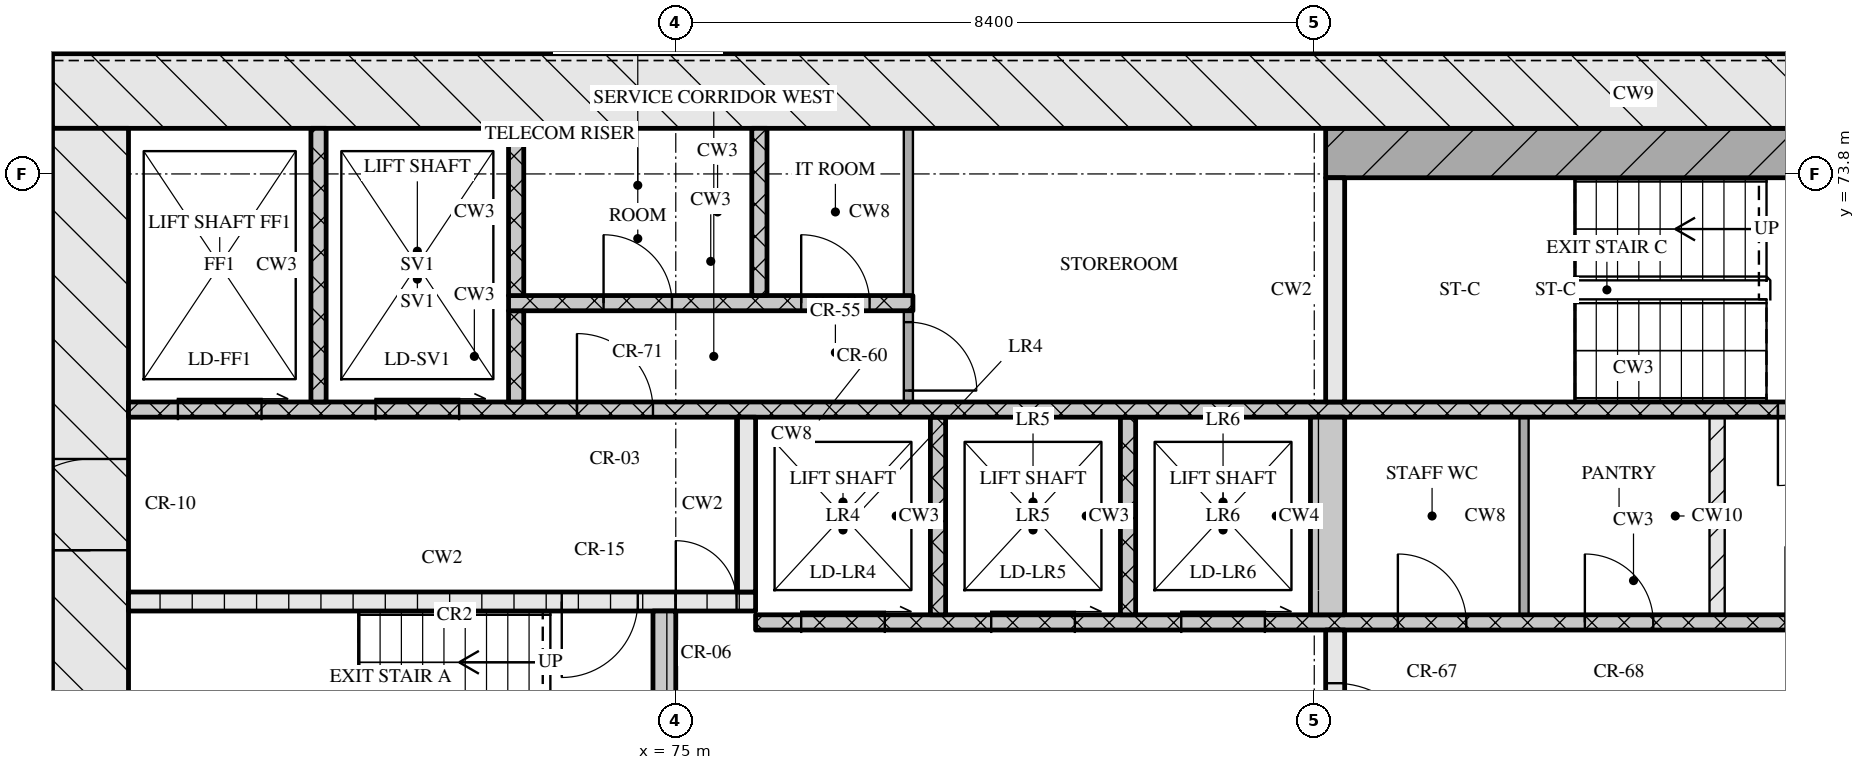
"""IFC4 building model, lengths in metres.
Left out: names, types, materials, properties, quantities, classifications, styles, units other than length and angle.
Written with IfcOpenShell. Run it as: python <this file> out.ifc"""

import sys

from ifc_helpers import new_model, si_unit, direction, frame, frame_2d, origin, place, context, subcontext, project, spatial, rectangle, extrude, element, fill, save


model = new_model("IFC4")
c1 = context("Model", 3, precision=1e-05, world=origin(), true_north=direction((0.0, 1.0)))
c2 = subcontext(c1, "Body", "Model", "MODEL_VIEW")
j1 = project(units=[si_unit("LENGTHUNIT", "METRE"), si_unit("PLANEANGLEUNIT", "RADIAN")], contexts=[c1])
p1 = place(None, origin())
s1 = spatial("IfcSite", under=j1, at=p1, CompositionType="ELEMENT")
p2 = place(p1, origin())
s2 = spatial("IfcBuilding", under=s1, at=p2, CompositionType="ELEMENT")
p3 = place(p2, frame((0.0, 0.0, 127.65)))
s3 = spatial("IfcBuildingStorey", under=s2, at=p3, CompositionType="ELEMENT", Elevation=127.65)
p4 = place(p3, frame((66.8, 74.9, 0.0), z_axis=(0.0, 0.0, 1.0), x_axis=(1.0, 0.0, 0.0)))
e1 = element("IfcWall", 1, at=p4, inside=s3, PredefinedType="SOLIDWALL", context=c2, shape_type="SweptSolid", body=[
    extrude(rectangle(XDim=41.6, YDim=1.0, at=frame_2d((20.8, 0.0))), origin(), (0.0, 0.0, 1.0), 3.32),
])
p5 = place(p3, frame((67.3, 62.4, 0.0), z_axis=(0.0, 0.0, 1.0), x_axis=(0.0, 1.0, 0.0)))
e2 = element("IfcWall", 2, at=p5, inside=s3, PredefinedType="SOLIDWALL", context=c2, shape_type="SweptSolid", body=[
    extrude(rectangle(XDim=12.0, YDim=1.0, at=frame_2d((6.0, 0.0))), origin(), (0.0, 0.0, 1.0), 3.32),
])
p6 = place(p5, frame((6.45, 0.0, 0.0)))
e3 = element("IfcOpeningElement", 3, at=p6, cuts=e2, PredefinedType="OPENING", context=c2, shape_type="SweptSolid", body=[
    extrude(rectangle(XDim=1.2, YDim=2.1, at=frame_2d((0.6, 1.05))), frame((0.0, 0.51, 0.0), z_axis=(0.0, -1.0, 0.0), x_axis=(1.0, 0.0, 0.0)), (0.0, 0.0, 1.0), 1.02),
])
p7 = place(p3, frame((74.85, 65.2, 0.0), z_axis=(0.0, 0.0, 1.0), x_axis=(0.0, 1.0, 0.0)))
e4 = element("IfcWall", 4, at=p7, inside=s3, PredefinedType="SOLIDWALL", context=c2, shape_type="SweptSolid", body=[
    extrude(rectangle(XDim=2.85, YDim=0.3, at=frame_2d((1.425, 0.0))), origin(), (0.0, 0.0, 1.0), 3.32),
])
p8 = place(p3, frame((83.675, 65.2, 0.0), z_axis=(0.0, 0.0, 1.0), x_axis=(0.0, 1.0, 0.0)))
e5 = element("IfcWall", 5, at=p8, inside=s3, PredefinedType="SOLIDWALL", context=c2, shape_type="SweptSolid", body=[
    extrude(rectangle(XDim=2.6, YDim=0.25, at=frame_2d((1.3, 0.0))), origin(), (0.0, 0.0, 1.0), 3.32),
])
p9 = place(p8, frame((0.7, 0.0, 0.0)))
e6 = element("IfcOpeningElement", 6, at=p9, cuts=e5, PredefinedType="OPENING", context=c2, shape_type="SweptSolid", body=[
    extrude(rectangle(XDim=1.2, YDim=2.1, at=frame_2d((0.6, 1.05))), frame((0.0, 0.135, 0.0), z_axis=(0.0, -1.0, 0.0), x_axis=(1.0, 0.0, 0.0)), (0.0, 0.0, 1.0), 0.27),
])
p10 = place(p3, frame((76.05, 67.9, 0.0), z_axis=(0.0, 0.0, 1.0), x_axis=(1.0, 0.0, 0.0)))
e7 = element("IfcWall", 7, at=p10, inside=s3, PredefinedType="SOLIDWALL", context=c2, shape_type="SweptSolid", body=[
    extrude(rectangle(XDim=23.1, YDim=0.2, at=frame_2d((11.55, 0.0))), origin(), (0.0, 0.0, 1.0), 3.32),
])
p11 = place(p10, frame((0.6, 0.0, 0.0)))
e8 = element("IfcOpeningElement", 8, at=p11, cuts=e7, PredefinedType="OPENING", context=c2, shape_type="SweptSolid", body=[
    extrude(rectangle(XDim=1.1, YDim=2.1, at=frame_2d((0.55, 1.05))), frame((0.0, 0.11, 0.0), z_axis=(0.0, -1.0, 0.0), x_axis=(1.0, 0.0, 0.0)), (0.0, 0.0, 1.0), 0.22),
])
p12 = place(p10, frame((3.1, 0.0, 0.0)))
e9 = element("IfcOpeningElement", 9, at=p12, cuts=e7, PredefinedType="OPENING", context=c2, shape_type="SweptSolid", body=[
    extrude(rectangle(XDim=1.1, YDim=2.1, at=frame_2d((0.55, 1.05))), frame((0.0, 0.11, 0.0), z_axis=(0.0, -1.0, 0.0), x_axis=(1.0, 0.0, 0.0)), (0.0, 0.0, 1.0), 0.22),
])
p13 = place(p10, frame((5.6, 0.0, 0.0)))
e10 = element("IfcOpeningElement", 10, at=p13, cuts=e7, PredefinedType="OPENING", context=c2, shape_type="SweptSolid", body=[
    extrude(rectangle(XDim=1.1, YDim=2.1, at=frame_2d((0.55, 1.05))), frame((0.0, 0.11, 0.0), z_axis=(0.0, -1.0, 0.0), x_axis=(1.0, 0.0, 0.0)), (0.0, 0.0, 1.0), 0.22),
])
p14 = place(p10, frame((8.45, 0.0, 0.0)))
e11 = element("IfcOpeningElement", 11, at=p14, cuts=e7, PredefinedType="OPENING", context=c2, shape_type="SweptSolid", body=[
    extrude(rectangle(XDim=0.9, YDim=2.1, at=frame_2d((0.45, 1.05))), frame((0.0, 0.11, 0.0), z_axis=(0.0, -1.0, 0.0), x_axis=(1.0, 0.0, 0.0)), (0.0, 0.0, 1.0), 0.22),
])
p15 = place(p10, frame((10.91, 0.0, 0.0)))
e12 = element("IfcOpeningElement", 12, at=p15, cuts=e7, PredefinedType="OPENING", context=c2, shape_type="SweptSolid", body=[
    extrude(rectangle(XDim=0.9, YDim=2.1, at=frame_2d((0.45, 1.05))), frame((0.0, 0.11, 0.0), z_axis=(0.0, -1.0, 0.0), x_axis=(1.0, 0.0, 0.0)), (0.0, 0.0, 1.0), 0.22),
])
p16 = place(p10, frame((13.55, 0.0, 0.0)))
e13 = element("IfcOpeningElement", 13, at=p16, cuts=e7, PredefinedType="OPENING", context=c2, shape_type="SweptSolid", body=[
    extrude(rectangle(XDim=1.0, YDim=2.1, at=frame_2d((0.5, 1.05))), frame((0.0, 0.11, 0.0), z_axis=(0.0, -1.0, 0.0), x_axis=(1.0, 0.0, 0.0)), (0.0, 0.0, 1.0), 0.22),
])
for number, where, z_axis, x_axis in (
    (14, (78.45, 68.0, 0.0), (0.0, 0.0, 1.0), (0.0, 1.0, 0.0)),
    (15, (80.95, 68.0, 0.0), (0.0, 0.0, 1.0), (0.0, 1.0, 0.0)),
):
    element("IfcWall", number, at=place(p3, frame(where, z_axis=z_axis, x_axis=x_axis)), inside=s3, PredefinedType="SOLIDWALL", context=c2, shape_type="SweptSolid", body=[
        extrude(rectangle(XDim=2.6, YDim=0.2, at=frame_2d((1.3, 0.0))), origin(), (0.0, 0.0, 1.0), 3.32),
    ])
p17 = place(p3, frame((83.575, 68.0, 0.0), z_axis=(0.0, 0.0, 1.0), x_axis=(0.0, 1.0, 0.0)))
e16 = element("IfcWall", 16, at=p17, inside=s3, PredefinedType="SOLIDWALL", context=c2, shape_type="SweptSolid", body=[
    extrude(rectangle(XDim=2.6, YDim=0.45, at=frame_2d((1.3, 0.0))), origin(), (0.0, 0.0, 1.0), 3.32),
])
p18 = place(p3, frame((86.16, 68.0, 0.0), z_axis=(0.0, 0.0, 1.0), x_axis=(0.0, 1.0, 0.0)))
e17 = element("IfcWall", 17, at=p18, inside=s3, PredefinedType="PARTITIONING", context=c2, shape_type="SweptSolid", body=[
    extrude(rectangle(XDim=2.6, YDim=0.12, at=frame_2d((1.3, 0.0))), origin(), (0.0, 0.0, 1.0), 3.32),
])
p19 = place(p3, frame((88.7, 68.0, 0.0), z_axis=(0.0, 0.0, 1.0), x_axis=(0.0, 1.0, 0.0)))
e18 = element("IfcWall", 18, at=p19, inside=s3, PredefinedType="PARTITIONING", context=c2, shape_type="SweptSolid", body=[
    extrude(rectangle(XDim=2.6, YDim=0.2, at=frame_2d((1.3, 0.0))), origin(), (0.0, 0.0, 1.0), 3.32),
])
p20 = place(p3, frame((67.8, 68.175, 0.0), z_axis=(0.0, 0.0, 1.0), x_axis=(1.0, 0.0, 0.0)))
e19 = element("IfcWall", 19, at=p20, inside=s3, PredefinedType="SOLIDWALL", context=c2, shape_type="SweptSolid", body=[
    extrude(rectangle(XDim=8.25, YDim=0.25, at=frame_2d((4.125, 0.0))), origin(), (0.0, 0.0, 1.0), 3.32),
])
p21 = place(p20, frame((5.7, 0.0, 0.0)))
e20 = element("IfcOpeningElement", 20, at=p21, cuts=e19, PredefinedType="OPENING", context=c2, shape_type="SweptSolid", body=[
    extrude(rectangle(XDim=1.0, YDim=2.1, at=frame_2d((0.5, 1.05))), frame((0.0, 0.135, 0.0), z_axis=(0.0, -1.0, 0.0), x_axis=(1.0, 0.0, 0.0)), (0.0, 0.0, 1.0), 0.27),
])
p22 = place(p20, frame((7.2, 0.0, 0.0)))
e21 = element("IfcOpeningElement", 21, at=p22, cuts=e19, PredefinedType="OPENING", context=c2, shape_type="SweptSolid", body=[
    extrude(rectangle(XDim=0.8, YDim=2.1, at=frame_2d((0.4, 1.05))), frame((0.0, 0.135, 0.0), z_axis=(0.0, -1.0, 0.0), x_axis=(1.0, 0.0, 0.0)), (0.0, 0.0, 1.0), 0.27),
])
p23 = place(p3, frame((75.925, 68.3, 0.0), z_axis=(0.0, 0.0, 1.0), x_axis=(0.0, 1.0, 0.0)))
e22 = element("IfcWall", 22, at=p23, inside=s3, PredefinedType="SOLIDWALL", context=c2, shape_type="SweptSolid", body=[
    extrude(rectangle(XDim=2.3, YDim=0.25, at=frame_2d((1.15, 0.0))), origin(), (0.0, 0.0, 1.0), 3.32),
])
p24 = place(p3, frame((67.8, 70.7, 0.0), z_axis=(0.0, 0.0, 1.0), x_axis=(1.0, 0.0, 0.0)))
e23 = element("IfcWall", 23, at=p24, inside=s3, PredefinedType="SOLIDWALL", context=c2, shape_type="SweptSolid", body=[
    extrude(rectangle(XDim=39.6, YDim=0.2, at=frame_2d((19.8, 0.0))), origin(), (0.0, 0.0, 1.0), 3.32),
])
p25 = place(p24, frame((0.65, 0.0, 0.0)))
e24 = element("IfcOpeningElement", 24, at=p25, cuts=e23, PredefinedType="OPENING", context=c2, shape_type="SweptSolid", body=[
    extrude(rectangle(XDim=1.1, YDim=2.1, at=frame_2d((0.55, 1.05))), frame((0.0, 0.11, 0.0), z_axis=(0.0, -1.0, 0.0), x_axis=(1.0, 0.0, 0.0)), (0.0, 0.0, 1.0), 0.22),
])
p26 = place(p24, frame((3.25, 0.0, 0.0)))
e25 = element("IfcOpeningElement", 25, at=p26, cuts=e23, PredefinedType="OPENING", context=c2, shape_type="SweptSolid", body=[
    extrude(rectangle(XDim=1.1, YDim=2.1, at=frame_2d((0.55, 1.05))), frame((0.0, 0.11, 0.0), z_axis=(0.0, -1.0, 0.0), x_axis=(1.0, 0.0, 0.0)), (0.0, 0.0, 1.0), 0.22),
])
p27 = place(p24, frame((5.9, 0.0, 0.0)))
e26 = element("IfcOpeningElement", 26, at=p27, cuts=e23, PredefinedType="OPENING", context=c2, shape_type="SweptSolid", body=[
    extrude(rectangle(XDim=1.0, YDim=2.1, at=frame_2d((0.5, 1.05))), frame((0.0, 0.11, 0.0), z_axis=(0.0, -1.0, 0.0), x_axis=(1.0, 0.0, 0.0)), (0.0, 0.0, 1.0), 0.22),
])
p28 = place(p24, frame((21.7, 0.0, 0.0)))
e27 = element("IfcOpeningElement", 27, at=p28, cuts=e23, PredefinedType="OPENING", context=c2, shape_type="SweptSolid", body=[
    extrude(rectangle(XDim=1.0, YDim=2.1, at=frame_2d((0.5, 1.05))), frame((0.0, 0.11, 0.0), z_axis=(0.0, -1.0, 0.0), x_axis=(1.0, 0.0, 0.0)), (0.0, 0.0, 1.0), 0.22),
])
p29 = place(p24, frame((32.7, 0.0, 0.0)))
e28 = element("IfcOpeningElement", 28, at=p29, cuts=e23, PredefinedType="OPENING", context=c2, shape_type="SweptSolid", body=[
    extrude(rectangle(XDim=1.0, YDim=2.1, at=frame_2d((0.5, 1.05))), frame((0.0, 0.11, 0.0), z_axis=(0.0, -1.0, 0.0), x_axis=(1.0, 0.0, 0.0)), (0.0, 0.0, 1.0), 0.22),
])
p30 = place(p24, frame((35.25, 0.0, 0.0)))
e29 = element("IfcOpeningElement", 29, at=p30, cuts=e23, PredefinedType="OPENING", context=c2, shape_type="SweptSolid", body=[
    extrude(rectangle(XDim=1.1, YDim=2.1, at=frame_2d((0.55, 1.05))), frame((0.0, 0.11, 0.0), z_axis=(0.0, -1.0, 0.0), x_axis=(1.0, 0.0, 0.0)), (0.0, 0.0, 1.0), 0.22),
])
p31 = place(p24, frame((37.85, 0.0, 0.0)))
e30 = element("IfcOpeningElement", 30, at=p31, cuts=e23, PredefinedType="OPENING", context=c2, shape_type="SweptSolid", body=[
    extrude(rectangle(XDim=1.1, YDim=2.1, at=frame_2d((0.55, 1.05))), frame((0.0, 0.11, 0.0), z_axis=(0.0, -1.0, 0.0), x_axis=(1.0, 0.0, 0.0)), (0.0, 0.0, 1.0), 0.22),
])
p32 = place(p3, frame((70.3, 70.8, 0.0), z_axis=(0.0, 0.0, 1.0), x_axis=(0.0, 1.0, 0.0)))
e31 = element("IfcWall", 31, at=p32, inside=s3, PredefinedType="SOLIDWALL", context=c2, shape_type="SweptSolid", body=[
    extrude(rectangle(XDim=3.6, YDim=0.2, at=frame_2d((1.8, 0.0))), origin(), (0.0, 0.0, 1.0), 3.32),
])
p33 = place(p3, frame((72.9, 70.8, 0.0), z_axis=(0.0, 0.0, 1.0), x_axis=(0.0, 1.0, 0.0)))
e32 = element("IfcWall", 32, at=p33, inside=s3, PredefinedType="SOLIDWALL", context=c2, shape_type="SweptSolid", body=[
    extrude(rectangle(XDim=1.2, YDim=0.2, at=frame_2d((0.6, 0.0))), origin(), (0.0, 0.0, 1.0), 3.32),
])
p34 = place(p3, frame((78.06, 70.8, 0.0), z_axis=(0.0, 0.0, 1.0), x_axis=(0.0, 1.0, 0.0)))
e33 = element("IfcWall", 33, at=p34, inside=s3, PredefinedType="PARTITIONING", context=c2, shape_type="SweptSolid", body=[
    extrude(rectangle(XDim=1.2, YDim=0.12, at=frame_2d((0.6, 0.0))), origin(), (0.0, 0.0, 1.0), 3.32),
])
p35 = place(p34, frame((0.15, 0.0, 0.0)))
e34 = element("IfcOpeningElement", 34, at=p35, cuts=e33, PredefinedType="OPENING", context=c2, shape_type="SweptSolid", body=[
    extrude(rectangle(XDim=0.9, YDim=2.1, at=frame_2d((0.45, 1.05))), frame((0.0, 0.07, 0.0), z_axis=(0.0, -1.0, 0.0), x_axis=(1.0, 0.0, 0.0)), (0.0, 0.0, 1.0), 0.14),
])
p36 = place(p3, frame((83.675, 70.8, 0.0), z_axis=(0.0, 0.0, 1.0), x_axis=(0.0, 1.0, 0.0)))
e35 = element("IfcWall", 35, at=p36, inside=s3, PredefinedType="SOLIDWALL", context=c2, shape_type="SweptSolid", body=[
    extrude(rectangle(XDim=2.95, YDim=0.25, at=frame_2d((1.475, 0.0))), origin(), (0.0, 0.0, 1.0), 3.32),
])
p37 = place(p3, frame((72.8, 72.1, 0.0), z_axis=(0.0, 0.0, 1.0), x_axis=(1.0, 0.0, 0.0)))
e36 = element("IfcWall", 36, at=p37, inside=s3, PredefinedType="SOLIDWALL", context=c2, shape_type="SweptSolid", body=[
    extrude(rectangle(XDim=5.32, YDim=0.2, at=frame_2d((2.66, 0.0))), origin(), (0.0, 0.0, 1.0), 3.32),
])
p38 = place(p37, frame((1.25, 0.0, 0.0)))
e37 = element("IfcOpeningElement", 37, at=p38, cuts=e36, PredefinedType="OPENING", context=c2, shape_type="SweptSolid", body=[
    extrude(rectangle(XDim=0.9, YDim=2.1, at=frame_2d((0.45, 1.05))), frame((0.0, 0.11, 0.0), z_axis=(0.0, -1.0, 0.0), x_axis=(1.0, 0.0, 0.0)), (0.0, 0.0, 1.0), 0.22),
])
p39 = place(p37, frame((3.85, 0.0, 0.0)))
e38 = element("IfcOpeningElement", 38, at=p39, cuts=e36, PredefinedType="OPENING", context=c2, shape_type="SweptSolid", body=[
    extrude(rectangle(XDim=0.9, YDim=2.1, at=frame_2d((0.45, 1.05))), frame((0.0, 0.11, 0.0), z_axis=(0.0, -1.0, 0.0), x_axis=(1.0, 0.0, 0.0)), (0.0, 0.0, 1.0), 0.22),
])
for number, where, z_axis, x_axis in (
    (39, (72.9, 72.2, 0.0), (0.0, 0.0, 1.0), (0.0, 1.0, 0.0)),
    (40, (76.1, 72.2, 0.0), (0.0, 0.0, 1.0), (0.0, 1.0, 0.0)),
):
    element("IfcWall", number, at=place(p3, frame(where, z_axis=z_axis, x_axis=x_axis)), inside=s3, PredefinedType="SOLIDWALL", context=c2, shape_type="SweptSolid", body=[
        extrude(rectangle(XDim=2.2, YDim=0.2, at=frame_2d((1.1, 0.0))), origin(), (0.0, 0.0, 1.0), 3.32),
    ])
p40 = place(p3, frame((78.06, 72.2, 0.0), z_axis=(0.0, 0.0, 1.0), x_axis=(0.0, 1.0, 0.0)))
e41 = element("IfcWall", 41, at=p40, inside=s3, PredefinedType="PARTITIONING", context=c2, shape_type="SweptSolid", body=[
    extrude(rectangle(XDim=2.2, YDim=0.12, at=frame_2d((1.1, 0.0))), origin(), (0.0, 0.0, 1.0), 3.32),
])
p41 = place(p3, frame((83.55, 74.075, 0.0), z_axis=(0.0, 0.0, 1.0), x_axis=(1.0, 0.0, 0.0)))
e42 = element("IfcWall", 42, at=p41, inside=s3, PredefinedType="SOLIDWALL", context=c2, shape_type="SweptSolid", body=[
    extrude(rectangle(XDim=8.1, YDim=0.65, at=frame_2d((4.05, 0.0))), origin(), (0.0, 0.0, 1.0), 3.32),
])
p42 = place(p9, origin())
e43 = element("IfcDoor", 43, at=p42, inside=s3, OperationType="SINGLE_SWING_RIGHT", PredefinedType="DOOR", context=c2, shape_type="SweptSolid", body=[
    extrude(rectangle(XDim=1.2, YDim=2.1, at=frame_2d((0.6, 1.05))), frame((0.0, 0.025, 0.0), z_axis=(0.0, -1.0, 0.0), x_axis=(1.0, 0.0, 0.0)), (0.0, 0.0, 1.0), 0.05),
])
fill(e6, e43)
p43 = place(p11, origin())
e44 = element("IfcDoor", 44, at=p43, inside=s3, OperationType="SLIDING_TO_RIGHT", PredefinedType="DOOR", context=c2, shape_type="SweptSolid", body=[
    extrude(rectangle(XDim=1.1, YDim=2.1, at=frame_2d((0.55, 1.05))), frame((0.0, 0.025, 0.0), z_axis=(0.0, -1.0, 0.0), x_axis=(1.0, 0.0, 0.0)), (0.0, 0.0, 1.0), 0.05),
])
fill(e8, e44)
p44 = place(p12, origin())
e45 = element("IfcDoor", 45, at=p44, inside=s3, OperationType="SLIDING_TO_RIGHT", PredefinedType="DOOR", context=c2, shape_type="SweptSolid", body=[
    extrude(rectangle(XDim=1.1, YDim=2.1, at=frame_2d((0.55, 1.05))), frame((0.0, 0.025, 0.0), z_axis=(0.0, -1.0, 0.0), x_axis=(1.0, 0.0, 0.0)), (0.0, 0.0, 1.0), 0.05),
])
fill(e9, e45)
p45 = place(p13, origin())
e46 = element("IfcDoor", 46, at=p45, inside=s3, OperationType="SLIDING_TO_RIGHT", PredefinedType="DOOR", context=c2, shape_type="SweptSolid", body=[
    extrude(rectangle(XDim=1.1, YDim=2.1, at=frame_2d((0.55, 1.05))), frame((0.0, 0.025, 0.0), z_axis=(0.0, -1.0, 0.0), x_axis=(1.0, 0.0, 0.0)), (0.0, 0.0, 1.0), 0.05),
])
fill(e10, e46)
p46 = place(p14, origin())
e47 = element("IfcDoor", 47, at=p46, inside=s3, OperationType="SINGLE_SWING_LEFT", PredefinedType="DOOR", context=c2, shape_type="SweptSolid", body=[
    extrude(rectangle(XDim=0.9, YDim=2.1, at=frame_2d((0.45, 1.05))), frame((0.0, 0.025, 0.0), z_axis=(0.0, -1.0, 0.0), x_axis=(1.0, 0.0, 0.0)), (0.0, 0.0, 1.0), 0.05),
])
fill(e11, e47)
p47 = place(p15, origin())
e48 = element("IfcDoor", 48, at=p47, inside=s3, OperationType="SINGLE_SWING_LEFT", PredefinedType="DOOR", context=c2, shape_type="SweptSolid", body=[
    extrude(rectangle(XDim=0.9, YDim=2.1, at=frame_2d((0.45, 1.05))), frame((0.0, 0.025, 0.0), z_axis=(0.0, -1.0, 0.0), x_axis=(1.0, 0.0, 0.0)), (0.0, 0.0, 1.0), 0.05),
])
fill(e12, e48)
p48 = place(p21, origin())
e49 = element("IfcDoor", 49, at=p48, inside=s3, OperationType="SINGLE_SWING_RIGHT", PredefinedType="DOOR", context=c2, shape_type="SweptSolid", body=[
    extrude(rectangle(XDim=1.0, YDim=2.1, at=frame_2d((0.5, 1.05))), frame((0.0, 0.025, 0.0), z_axis=(0.0, -1.0, 0.0), x_axis=(1.0, 0.0, 0.0)), (0.0, 0.0, 1.0), 0.05),
])
fill(e20, e49)
p49 = place(p22, origin())
e50 = element("IfcDoor", 50, at=p49, inside=s3, OperationType="SINGLE_SWING_LEFT", PredefinedType="DOOR", context=c2, shape_type="SweptSolid", body=[
    extrude(rectangle(XDim=0.8, YDim=2.1, at=frame_2d((0.4, 1.05))), frame((0.0, 0.025, 0.0), z_axis=(0.0, -1.0, 0.0), x_axis=(1.0, 0.0, 0.0)), (0.0, 0.0, 1.0), 0.05),
])
fill(e21, e50)
p50 = place(p6, origin())
e51 = element("IfcDoor", 51, at=p50, inside=s3, OperationType="SINGLE_SWING_LEFT", PredefinedType="DOOR", context=c2, shape_type="SweptSolid", body=[
    extrude(rectangle(XDim=1.2, YDim=2.1, at=frame_2d((0.6, 1.05))), frame((0.0, 0.025, 0.0), z_axis=(0.0, -1.0, 0.0), x_axis=(1.0, 0.0, 0.0)), (0.0, 0.0, 1.0), 0.05),
])
fill(e3, e51)
p51 = place(p25, origin())
e52 = element("IfcDoor", 52, at=p51, inside=s3, OperationType="SLIDING_TO_RIGHT", PredefinedType="DOOR", context=c2, shape_type="SweptSolid", body=[
    extrude(rectangle(XDim=1.1, YDim=2.1, at=frame_2d((0.55, 1.05))), frame((0.0, 0.025, 0.0), z_axis=(0.0, -1.0, 0.0), x_axis=(1.0, 0.0, 0.0)), (0.0, 0.0, 1.0), 0.05),
])
fill(e24, e52)
p52 = place(p26, origin())
e53 = element("IfcDoor", 53, at=p52, inside=s3, OperationType="SLIDING_TO_RIGHT", PredefinedType="DOOR", context=c2, shape_type="SweptSolid", body=[
    extrude(rectangle(XDim=1.1, YDim=2.1, at=frame_2d((0.55, 1.05))), frame((0.0, 0.025, 0.0), z_axis=(0.0, -1.0, 0.0), x_axis=(1.0, 0.0, 0.0)), (0.0, 0.0, 1.0), 0.05),
])
fill(e25, e53)
p53 = place(p27, origin())
e54 = element("IfcDoor", 54, at=p53, inside=s3, OperationType="SINGLE_SWING_LEFT", PredefinedType="DOOR", context=c2, shape_type="SweptSolid", body=[
    extrude(rectangle(XDim=1.0, YDim=2.1, at=frame_2d((0.5, 1.05))), frame((0.0, 0.025, 0.0), z_axis=(0.0, -1.0, 0.0), x_axis=(1.0, 0.0, 0.0)), (0.0, 0.0, 1.0), 0.05),
])
fill(e26, e54)
p54 = place(p28, origin())
e55 = element("IfcDoor", 55, at=p54, inside=s3, OperationType="SINGLE_SWING_RIGHT", PredefinedType="DOOR", context=c2, shape_type="SweptSolid", body=[
    extrude(rectangle(XDim=1.0, YDim=2.1, at=frame_2d((0.5, 1.05))), frame((0.0, 0.025, 0.0), z_axis=(0.0, -1.0, 0.0), x_axis=(1.0, 0.0, 0.0)), (0.0, 0.0, 1.0), 0.05),
])
fill(e27, e55)
p55 = place(p35, origin())
e56 = element("IfcDoor", 56, at=p55, inside=s3, OperationType="SINGLE_SWING_RIGHT", PredefinedType="DOOR", context=c2, shape_type="SweptSolid", body=[
    extrude(rectangle(XDim=0.9, YDim=2.1, at=frame_2d((0.45, 1.05))), frame((0.0, 0.025, 0.0), z_axis=(0.0, -1.0, 0.0), x_axis=(1.0, 0.0, 0.0)), (0.0, 0.0, 1.0), 0.05),
])
fill(e34, e56)
p56 = place(p38, origin())
e57 = element("IfcDoor", 57, at=p56, inside=s3, OperationType="SINGLE_SWING_LEFT", PredefinedType="DOOR", context=c2, shape_type="SweptSolid", body=[
    extrude(rectangle(XDim=0.9, YDim=2.1, at=frame_2d((0.45, 1.05))), frame((0.0, 0.025, 0.0), z_axis=(0.0, -1.0, 0.0), x_axis=(1.0, 0.0, 0.0)), (0.0, 0.0, 1.0), 0.05),
])
fill(e37, e57)
p57 = place(p39, origin())
e58 = element("IfcDoor", 58, at=p57, inside=s3, OperationType="SINGLE_SWING_LEFT", PredefinedType="DOOR", context=c2, shape_type="SweptSolid", body=[
    extrude(rectangle(XDim=0.9, YDim=2.1, at=frame_2d((0.45, 1.05))), frame((0.0, 0.025, 0.0), z_axis=(0.0, -1.0, 0.0), x_axis=(1.0, 0.0, 0.0)), (0.0, 0.0, 1.0), 0.05),
])
fill(e38, e58)
save(model, sys.argv[1])
